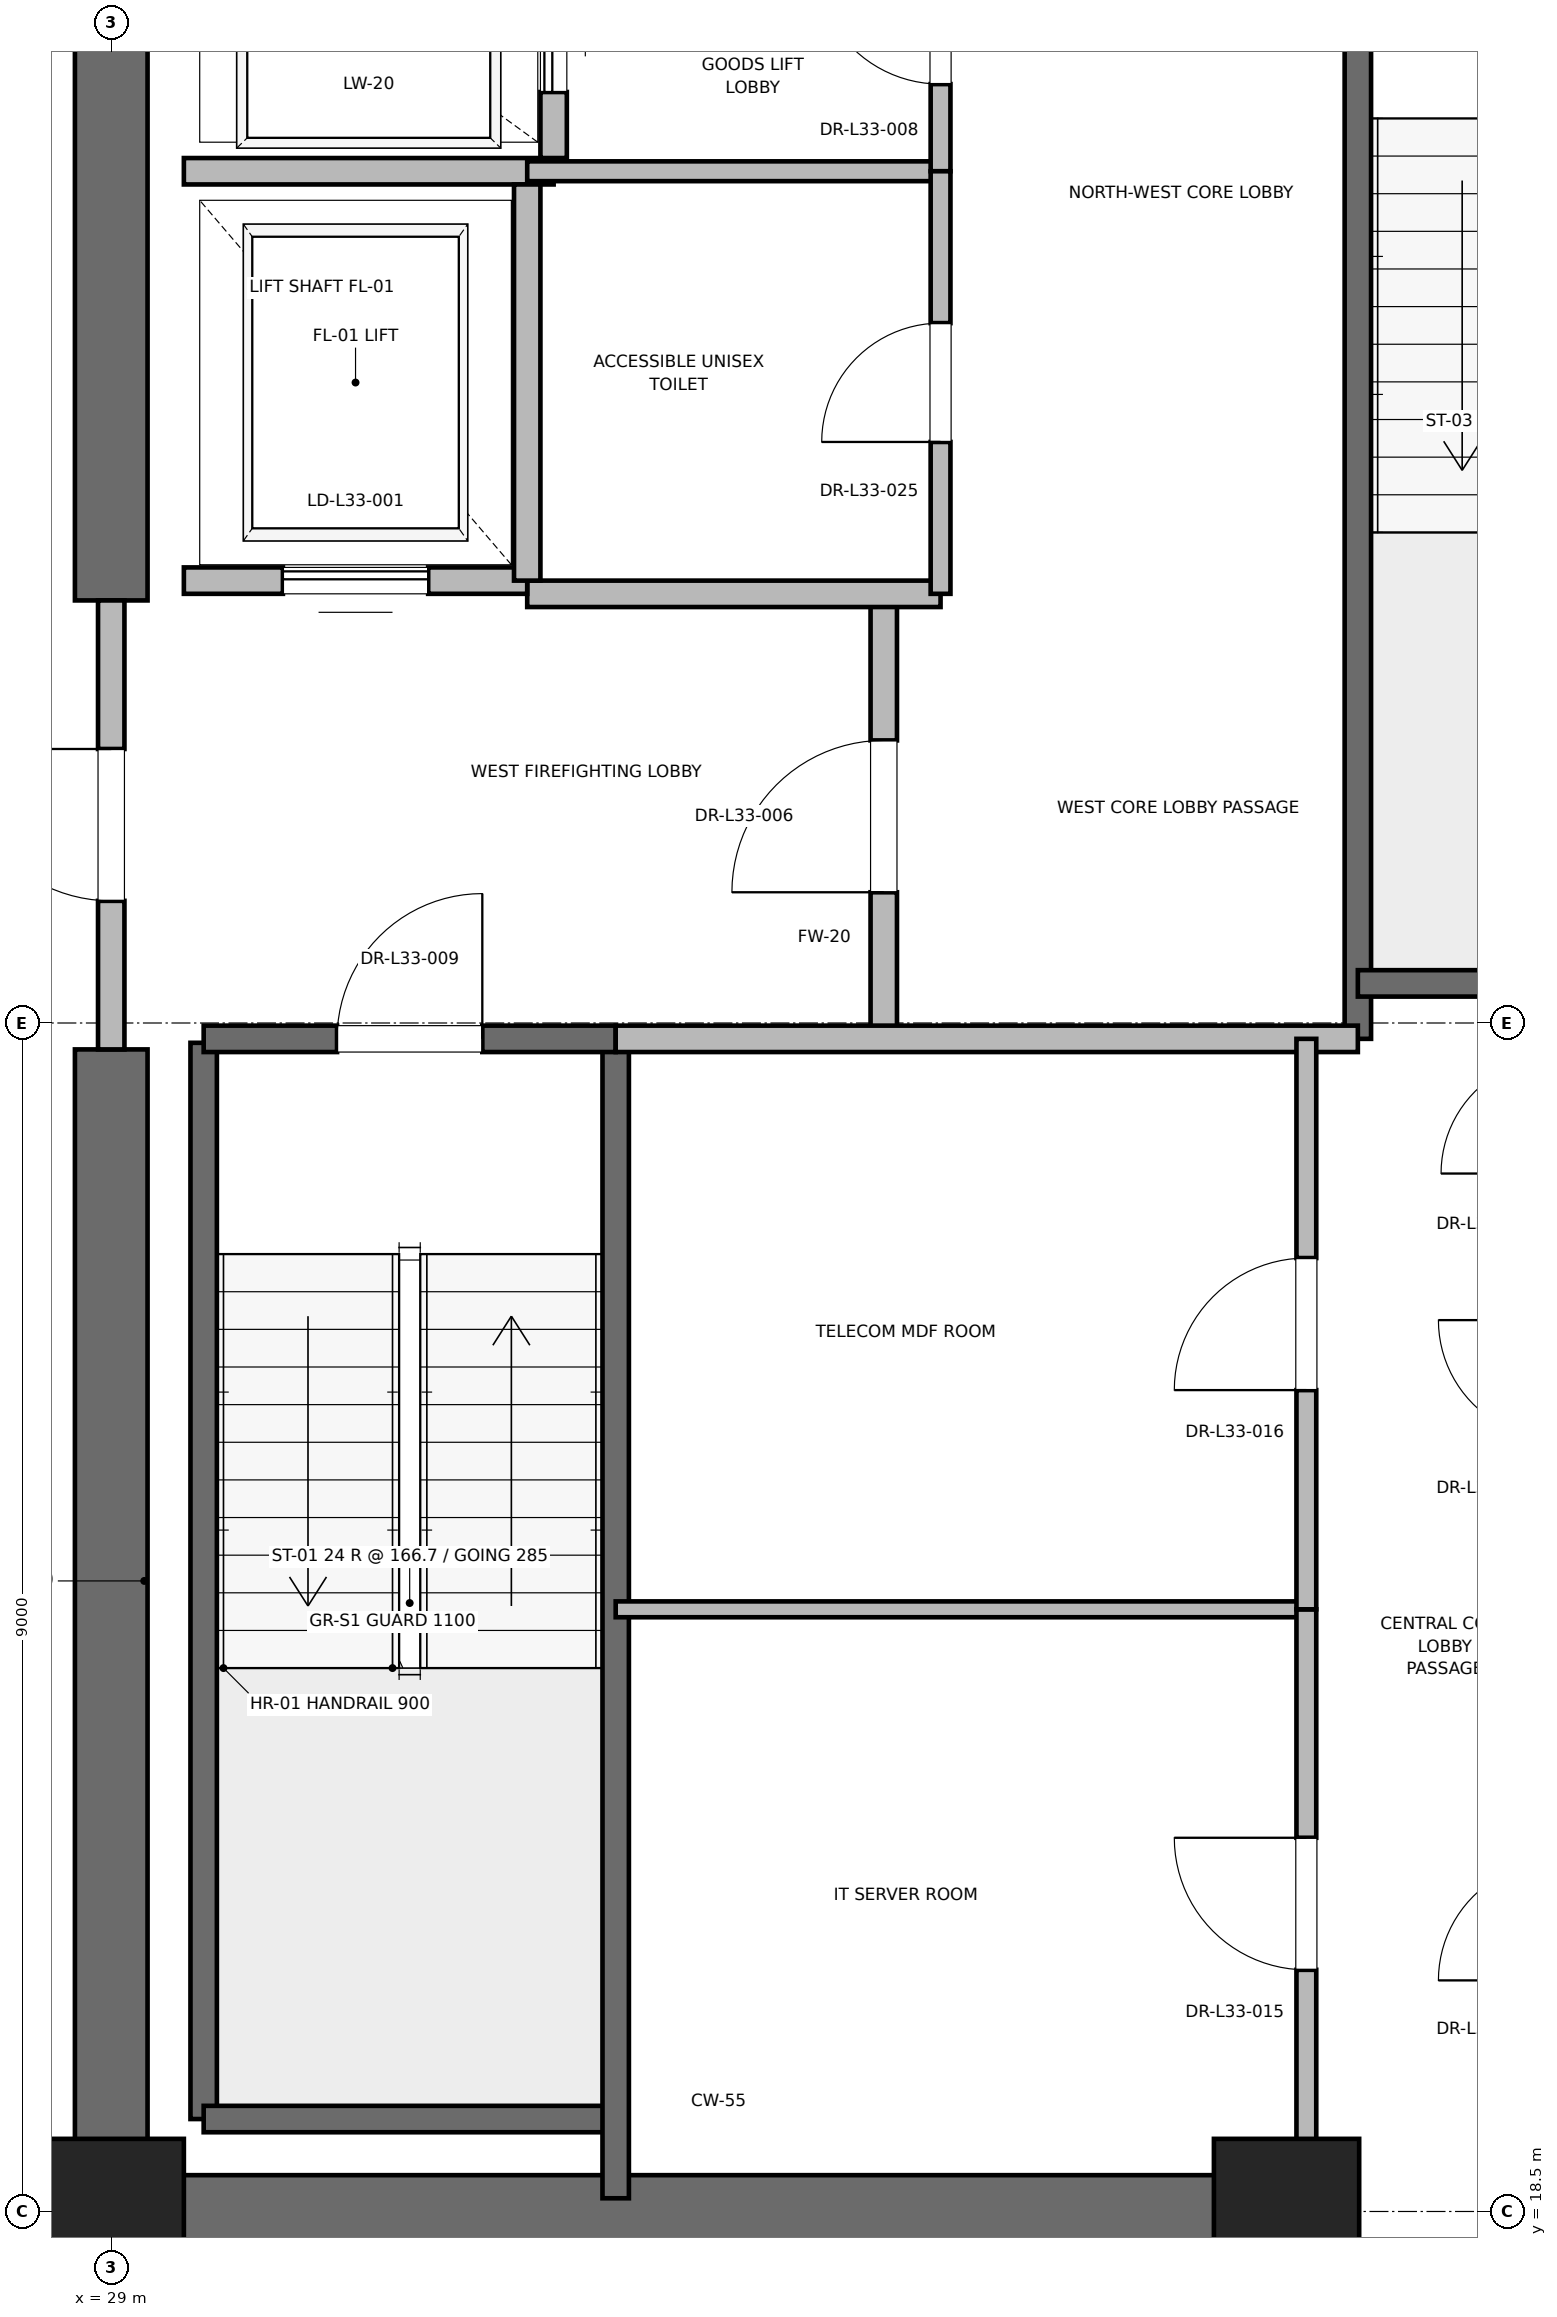
"""IFC4 building model, lengths in metres.
Left out: names, types, materials, properties, quantities, classifications, styles, units other than length and angle.
Written with IfcOpenShell. Run it as: python <this file> out.ifc"""

import sys

from ifc_helpers import new_model, si_unit, direction, frame, frame_2d, origin, origin_2d, place, context, subcontext, project, spatial, rectangle, extrude, element, fill, save


model = new_model("IFC4")
c1 = context("Model", 3, precision=1e-05, world=origin(), true_north=direction((0.0, 1.0)))
c2 = subcontext(c1, "Body", "Model", "MODEL_VIEW")
j1 = project(units=[si_unit("LENGTHUNIT", "METRE"), si_unit("PLANEANGLEUNIT", "RADIAN")], contexts=[c1])
p1 = place(None, origin())
s1 = spatial("IfcSite", under=j1, at=p1, CompositionType="ELEMENT")
p2 = place(p1, origin())
s2 = spatial("IfcBuilding", under=s1, at=p2, CompositionType="ELEMENT")
p3 = place(p2, frame((0.0, 0.0, 144.4)))
s3 = spatial("IfcBuildingStorey", under=s2, at=p3, CompositionType="ELEMENT", Elevation=144.4)
for number, where, z_axis, x_axis in (
    (1, (29.0, 18.5, 0.0), (0.0, 0.0, 1.0), (1.0, 0.0, 0.0)),
    (2, (37.9, 18.5, 0.0), (0.0, 0.0, 1.0), (1.0, 0.0, 0.0)),
):
    element("IfcColumn", number, at=place(p3, frame(where, z_axis=z_axis, x_axis=x_axis)), inside=s3, PredefinedType="PILASTER", context=c2, shape_type="SweptSolid", body=[
        extrude(rectangle(XDim=1.1, YDim=1.1, at=origin_2d()), origin(), (0.0, 0.0, 1.0), 4.0),
    ])
p4 = place(p3, frame((29.0, 18.5, 0.0), z_axis=(0.0, 0.0, 1.0), x_axis=(1.0, 0.0, 0.0)))
e3 = element("IfcWall", 3, at=p4, inside=s3, PredefinedType="SHEAR", context=c2, shape_type="SweptSolid", body=[
    extrude(rectangle(XDim=9.2, YDim=0.55, at=frame_2d((4.6, 0.0))), origin(), (0.0, 0.0, 1.0), 3.775),
])
p5 = place(p3, frame((29.0, 18.5, 0.0), z_axis=(0.0, 0.0, 1.0), x_axis=(0.0, 1.0, 0.0)))
e4 = element("IfcWall", 4, at=p5, inside=s3, PredefinedType="SHEAR", context=c2, shape_type="SweptSolid", body=[
    extrude(rectangle(XDim=8.8, YDim=0.55, at=frame_2d((4.4, 0.0))), origin(), (0.0, 0.0, 1.0), 3.775),
])
p6 = place(p3, frame((29.0, 30.7, 0.0), z_axis=(0.0, 0.0, 1.0), x_axis=(0.0, 1.0, 0.0)))
e5 = element("IfcWall", 5, at=p6, inside=s3, PredefinedType="SHEAR", context=c2, shape_type="SweptSolid", body=[
    extrude(rectangle(XDim=5.8, YDim=0.55, at=frame_2d((2.9, 0.0))), origin(), (0.0, 0.0, 1.0), 3.775),
])
p7 = place(p3, frame((29.7, 19.2, 0.0), z_axis=(0.0, 0.0, 1.0), x_axis=(0.0, 1.0, 0.0)))
e6 = element("IfcWall", 6, at=p7, inside=s3, PredefinedType="SOLIDWALL", context=c2, shape_type="SweptSolid", body=[
    extrude(rectangle(XDim=8.15, YDim=0.2, at=frame_2d((4.075, 0.0))), origin(), (0.0, 0.0, 1.0), 3.775),
])
p8 = place(p3, frame((29.7, 19.2, 0.0), z_axis=(0.0, 0.0, 1.0), x_axis=(1.0, 0.0, 0.0)))
e7 = element("IfcWall", 7, at=p8, inside=s3, PredefinedType="SOLIDWALL", context=c2, shape_type="SweptSolid", body=[
    extrude(rectangle(XDim=3.12, YDim=0.2, at=frame_2d((1.56, 0.0))), origin(), (0.0, 0.0, 1.0), 3.775),
])
p9 = place(p3, frame((32.82, 18.6, 0.0), z_axis=(0.0, 0.0, 1.0), x_axis=(0.0, 1.0, 0.0)))
e8 = element("IfcWall", 8, at=p9, inside=s3, PredefinedType="SOLIDWALL", context=c2, shape_type="SweptSolid", body=[
    extrude(rectangle(XDim=8.78, YDim=0.2, at=frame_2d((4.39, 0.0))), origin(), (0.0, 0.0, 1.0), 3.775),
])
p10 = place(p3, frame((29.7, 27.38, 0.0), z_axis=(0.0, 0.0, 1.0), x_axis=(1.0, 0.0, 0.0)))
e9 = element("IfcWall", 9, at=p10, inside=s3, PredefinedType="SOLIDWALL", context=c2, shape_type="SweptSolid", body=[
    extrude(rectangle(XDim=3.12, YDim=0.2, at=frame_2d((1.56, 0.0))), origin(), (0.0, 0.0, 1.0), 3.775),
])
p11 = place(p10, frame((1.01, 0.0, 0.0)))
e10 = element("IfcOpeningElement", 10, at=p11, cuts=e9, PredefinedType="OPENING", context=c2, shape_type="SweptSolid", body=[
    extrude(rectangle(XDim=1.1, YDim=2.15, at=frame_2d((0.55, 1.075))), frame((0.0, 0.1, 0.0), z_axis=(0.0, -1.0, 0.0), x_axis=(1.0, 0.0, 0.0)), (0.0, 0.0, 1.0), 0.2),
])
p12 = place(p3, frame((38.44, 27.38, 0.0), z_axis=(0.0, 0.0, 1.0), x_axis=(0.0, 1.0, 0.0)))
e11 = element("IfcWall", 11, at=p12, inside=s3, PredefinedType="SOLIDWALL", context=c2, shape_type="SweptSolid", body=[
    extrude(rectangle(XDim=8.87, YDim=0.2, at=frame_2d((4.435, 0.0))), origin(), (0.0, 0.0, 1.0), 3.775),
])
p13 = place(p3, frame((38.44, 27.8, 0.0), z_axis=(0.0, 0.0, 1.0), x_axis=(1.0, 0.0, 0.0)))
e12 = element("IfcWall", 12, at=p13, inside=s3, PredefinedType="SOLIDWALL", context=c2, shape_type="SweptSolid", body=[
    extrude(rectangle(XDim=3.32, YDim=0.2, at=frame_2d((1.66, 0.0))), origin(), (0.0, 0.0, 1.0), 3.775),
])
p14 = place(p3, frame((34.85, 27.38, 0.0), z_axis=(0.0, 0.0, 1.0), x_axis=(0.0, 1.0, 0.0)))
e13 = element("IfcWall", 13, at=p14, inside=s3, PredefinedType="PARTITIONING", context=c2, shape_type="SweptSolid", body=[
    extrude(rectangle(XDim=3.37, YDim=0.2, at=frame_2d((1.685, 0.0))), origin(), (0.0, 0.0, 1.0), 3.775),
])
p15 = place(p14, frame((1.11, 0.0, 0.0)))
e14 = element("IfcOpeningElement", 14, at=p15, cuts=e13, PredefinedType="OPENING", context=c2, shape_type="SweptSolid", body=[
    extrude(rectangle(XDim=1.15, YDim=2.2, at=frame_2d((0.575, 1.1))), frame((0.0, 0.1, 0.0), z_axis=(0.0, -1.0, 0.0), x_axis=(1.0, 0.0, 0.0)), (0.0, 0.0, 1.0), 0.2),
])
p16 = place(p3, frame((29.0, 27.3, 0.0), z_axis=(0.0, 0.0, 1.0), x_axis=(0.0, 1.0, 0.0)))
e15 = element("IfcWall", 15, at=p16, inside=s3, PredefinedType="PARTITIONING", context=c2, shape_type="SweptSolid", body=[
    extrude(rectangle(XDim=3.4, YDim=0.2, at=frame_2d((1.7, 0.0))), origin(), (0.0, 0.0, 1.0), 2.755),
])
p17 = place(p16, frame((1.125, 0.0, 0.0)))
e16 = element("IfcOpeningElement", 16, at=p17, cuts=e15, PredefinedType="OPENING", context=c2, shape_type="SweptSolid", body=[
    extrude(rectangle(XDim=1.15, YDim=2.2, at=frame_2d((0.575, 1.1))), frame((0.0, 0.1, 0.0), z_axis=(0.0, -1.0, 0.0), x_axis=(1.0, 0.0, 0.0)), (0.0, 0.0, 1.0), 0.2),
])
p18 = place(p3, frame((32.82, 27.38, 0.0), z_axis=(0.0, 0.0, 1.0), x_axis=(1.0, 0.0, 0.0)))
e17 = element("IfcWall", 17, at=p18, inside=s3, PredefinedType="PARTITIONING", context=c2, shape_type="SweptSolid", body=[
    extrude(rectangle(XDim=5.62, YDim=0.2, at=frame_2d((2.81, 0.0))), origin(), (0.0, 0.0, 1.0), 3.775),
])
p19 = place(p3, frame((32.15, 30.75, 0.0), z_axis=(0.0, 0.0, 1.0), x_axis=(1.0, 0.0, 0.0)))
e18 = element("IfcWall", 18, at=p19, inside=s3, PredefinedType="PARTITIONING", context=c2, shape_type="SweptSolid", body=[
    extrude(rectangle(XDim=3.13, YDim=0.2, at=frame_2d((1.565, 0.0))), origin(), (0.0, 0.0, 1.0), 3.775),
])
p20 = place(p3, frame((29.55, 30.85, 0.0), z_axis=(0.0, 0.0, 1.0), x_axis=(1.0, 0.0, 0.0)))
e19 = element("IfcWall", 19, at=p20, inside=s3, PredefinedType="SOLIDWALL", context=c2, shape_type="SweptSolid", body=[
    extrude(rectangle(XDim=2.6, YDim=0.2, at=frame_2d((1.3, 0.0))), origin(), (0.0, 0.0, 1.0), 2.755),
])
p21 = place(p20, frame((0.75, 0.0, 0.0)))
e20 = element("IfcOpeningElement", 20, at=p21, cuts=e19, PredefinedType="OPENING", context=c2, shape_type="SweptSolid", body=[
    extrude(rectangle(XDim=1.1, YDim=2.2, at=frame_2d((0.55, 1.1))), frame((0.0, 0.1, 0.0), z_axis=(0.0, -1.0, 0.0), x_axis=(1.0, 0.0, 0.0)), (0.0, 0.0, 1.0), 0.2),
])
p22 = place(p3, frame((29.55, 33.95, 0.0), z_axis=(0.0, 0.0, 1.0), x_axis=(1.0, 0.0, 0.0)))
e21 = element("IfcWall", 21, at=p22, inside=s3, PredefinedType="SOLIDWALL", context=c2, shape_type="SweptSolid", body=[
    extrude(rectangle(XDim=2.8, YDim=0.2, at=frame_2d((1.4, 0.0))), origin(), (0.0, 0.0, 1.0), 3.775),
])
p23 = place(p3, frame((32.15, 30.85, 0.0), z_axis=(0.0, 0.0, 1.0), x_axis=(0.0, 1.0, 0.0)))
e22 = element("IfcWall", 22, at=p23, inside=s3, PredefinedType="SOLIDWALL", context=c2, shape_type="SweptSolid", body=[
    extrude(rectangle(XDim=3.0, YDim=0.2, at=frame_2d((1.5, 0.0))), origin(), (0.0, 0.0, 1.0), 3.775),
])
p24 = place(p3, frame((32.35, 34.05, 0.0), z_axis=(0.0, 0.0, 1.0), x_axis=(0.0, 1.0, 0.0)))
e23 = element("IfcWall", 23, at=p24, inside=s3, PredefinedType="SOLIDWALL", context=c2, shape_type="SweptSolid", body=[
    extrude(rectangle(XDim=2.1, YDim=0.2, at=frame_2d((1.05, 0.0))), origin(), (0.0, 0.0, 1.0), 3.775),
])
p25 = place(p24, frame((0.5, 0.0, 0.0)))
e24 = element("IfcOpeningElement", 24, at=p25, cuts=e23, PredefinedType="OPENING", context=c2, shape_type="SweptSolid", body=[
    extrude(rectangle(XDim=1.1, YDim=2.2, at=frame_2d((0.55, 1.1))), frame((0.0, 0.1, 0.0), z_axis=(0.0, -1.0, 0.0), x_axis=(1.0, 0.0, 0.0)), (0.0, 0.0, 1.0), 0.2),
])
p26 = place(p3, frame((32.15, 33.95, 0.0), z_axis=(0.0, 0.0, 1.0), x_axis=(1.0, 0.0, 0.0)))
e25 = element("IfcWall", 25, at=p26, inside=s3, PredefinedType="PARTITIONING", context=c2, shape_type="SweptSolid", body=[
    extrude(rectangle(XDim=3.13, YDim=0.15, at=frame_2d((1.565, 0.0))), origin(), (0.0, 0.0, 1.0), 2.85),
])
p27 = place(p3, frame((35.28, 33.95, 0.0), z_axis=(0.0, 0.0, 1.0), x_axis=(0.0, 1.0, 0.0)))
e26 = element("IfcWall", 26, at=p27, inside=s3, PredefinedType="PARTITIONING", context=c2, shape_type="SweptSolid", body=[
    extrude(rectangle(XDim=2.27, YDim=0.15, at=frame_2d((1.135, 0.0))), origin(), (0.0, 0.0, 1.0), 2.755),
])
p28 = place(p27, frame((0.66, 0.0, 0.0)))
e27 = element("IfcOpeningElement", 27, at=p28, cuts=e26, PredefinedType="OPENING", context=c2, shape_type="SweptSolid", body=[
    extrude(rectangle(XDim=0.95, YDim=2.15, at=frame_2d((0.475, 1.075))), frame((0.0, 0.075, 0.0), z_axis=(0.0, -1.0, 0.0), x_axis=(1.0, 0.0, 0.0)), (0.0, 0.0, 1.0), 0.15),
])
p29 = place(p3, frame((35.28, 30.75, 0.0), z_axis=(0.0, 0.0, 1.0), x_axis=(0.0, 1.0, 0.0)))
e28 = element("IfcWall", 28, at=p29, inside=s3, PredefinedType="PARTITIONING", context=c2, shape_type="SweptSolid", body=[
    extrude(rectangle(XDim=3.2, YDim=0.15, at=frame_2d((1.6, 0.0))), origin(), (0.0, 0.0, 1.0), 2.85),
])
p30 = place(p29, frame((1.15, 0.0, 0.0)))
e29 = element("IfcOpeningElement", 29, at=p30, cuts=e28, PredefinedType="OPENING", context=c2, shape_type="SweptSolid", body=[
    extrude(rectangle(XDim=0.9, YDim=2.1, at=frame_2d((0.45, 1.05))), frame((0.0, 0.075, 0.0), z_axis=(0.0, -1.0, 0.0), x_axis=(1.0, 0.0, 0.0)), (0.0, 0.0, 1.0), 0.15),
])
p31 = place(p3, frame((32.82, 23.06, 0.0), z_axis=(0.0, 0.0, 1.0), x_axis=(1.0, 0.0, 0.0)))
e30 = element("IfcWall", 30, at=p31, inside=s3, PredefinedType="PARTITIONING", context=c2, shape_type="SweptSolid", body=[
    extrude(rectangle(XDim=5.23, YDim=0.12, at=frame_2d((2.615, 0.0))), origin(), (0.0, 0.0, 1.0), 2.85),
])
p32 = place(p3, frame((38.05, 18.6, 0.0), z_axis=(0.0, 0.0, 1.0), x_axis=(0.0, 1.0, 0.0)))
e31 = element("IfcWall", 31, at=p32, inside=s3, PredefinedType="PARTITIONING", context=c2, shape_type="SweptSolid", body=[
    extrude(rectangle(XDim=4.46, YDim=0.15, at=frame_2d((2.23, 0.0))), origin(), (0.0, 0.0, 1.0), 2.755),
])
p33 = place(p32, frame((1.73, 0.0, 0.0)))
e32 = element("IfcOpeningElement", 32, at=p33, cuts=e31, PredefinedType="OPENING", context=c2, shape_type="SweptSolid", body=[
    extrude(rectangle(XDim=1.0, YDim=2.15, at=frame_2d((0.5, 1.075))), frame((0.0, 0.075, 0.0), z_axis=(0.0, -1.0, 0.0), x_axis=(1.0, 0.0, 0.0)), (0.0, 0.0, 1.0), 0.15),
])
p34 = place(p3, frame((38.05, 23.06, 0.0), z_axis=(0.0, 0.0, 1.0), x_axis=(0.0, 1.0, 0.0)))
e33 = element("IfcWall", 33, at=p34, inside=s3, PredefinedType="PARTITIONING", context=c2, shape_type="SweptSolid", body=[
    extrude(rectangle(XDim=4.32, YDim=0.15, at=frame_2d((2.16, 0.0))), origin(), (0.0, 0.0, 1.0), 2.85),
])
p35 = place(p34, frame((1.66, 0.0, 0.0)))
e34 = element("IfcOpeningElement", 34, at=p35, cuts=e33, PredefinedType="OPENING", context=c2, shape_type="SweptSolid", body=[
    extrude(rectangle(XDim=1.0, YDim=2.15, at=frame_2d((0.5, 1.075))), frame((0.0, 0.075, 0.0), z_axis=(0.0, -1.0, 0.0), x_axis=(1.0, 0.0, 0.0)), (0.0, 0.0, 1.0), 0.15),
])
p36 = place(p11, origin())
e35 = element("IfcDoor", 35, at=p36, inside=s3, OperationType="SINGLE_SWING_RIGHT", PredefinedType="DOOR", context=c2, shape_type="SweptSolid", body=[
    extrude(rectangle(XDim=1.1, YDim=2.15, at=frame_2d((0.55, 1.075))), frame((0.0, 0.025, 0.0), z_axis=(0.0, -1.0, 0.0), x_axis=(1.0, 0.0, 0.0)), (0.0, 0.0, 1.0), 0.05),
])
fill(e10, e35)
p37 = place(p15, origin())
e36 = element("IfcDoor", 36, at=p37, inside=s3, OperationType="SINGLE_SWING_LEFT", PredefinedType="DOOR", context=c2, shape_type="SweptSolid", body=[
    extrude(rectangle(XDim=1.15, YDim=2.2, at=frame_2d((0.575, 1.1))), frame((0.0, 0.025, 0.0), z_axis=(0.0, -1.0, 0.0), x_axis=(1.0, 0.0, 0.0)), (0.0, 0.0, 1.0), 0.05),
])
fill(e14, e36)
p38 = place(p17, origin())
e37 = element("IfcDoor", 37, at=p38, inside=s3, OperationType="SINGLE_SWING_RIGHT", PredefinedType="DOOR", context=c2, shape_type="SweptSolid", body=[
    extrude(rectangle(XDim=1.15, YDim=2.2, at=frame_2d((0.575, 1.1))), frame((0.0, 0.025, 0.0), z_axis=(0.0, -1.0, 0.0), x_axis=(1.0, 0.0, 0.0)), (0.0, 0.0, 1.0), 0.05),
])
fill(e16, e37)
p39 = place(p21, origin())
e38 = element("IfcDoor", 38, at=p39, inside=s3, OperationType="SLIDING_TO_RIGHT", PredefinedType="DOOR", context=c2, shape_type="SweptSolid", body=[
    extrude(rectangle(XDim=1.1, YDim=2.2, at=frame_2d((0.55, 1.1))), frame((0.0, 0.025, 0.0), z_axis=(0.0, -1.0, 0.0), x_axis=(1.0, 0.0, 0.0)), (0.0, 0.0, 1.0), 0.05),
])
fill(e20, e38)
p40 = place(p25, origin())
e39 = element("IfcDoor", 39, at=p40, inside=s3, OperationType="SLIDING_TO_RIGHT", PredefinedType="DOOR", context=c2, shape_type="SweptSolid", body=[
    extrude(rectangle(XDim=1.1, YDim=2.2, at=frame_2d((0.55, 1.1))), frame((0.0, 0.025, 0.0), z_axis=(0.0, -1.0, 0.0), x_axis=(1.0, 0.0, 0.0)), (0.0, 0.0, 1.0), 0.05),
])
fill(e24, e39)
p41 = place(p28, origin())
e40 = element("IfcDoor", 40, at=p41, inside=s3, OperationType="SINGLE_SWING_RIGHT", PredefinedType="DOOR", context=c2, shape_type="SweptSolid", body=[
    extrude(rectangle(XDim=0.95, YDim=2.15, at=frame_2d((0.475, 1.075))), frame((0.0, 0.025, 0.0), z_axis=(0.0, -1.0, 0.0), x_axis=(1.0, 0.0, 0.0)), (0.0, 0.0, 1.0), 0.05),
])
fill(e27, e40)
p42 = place(p30, origin())
e41 = element("IfcDoor", 41, at=p42, inside=s3, OperationType="SINGLE_SWING_LEFT", PredefinedType="DOOR", context=c2, shape_type="SweptSolid", body=[
    extrude(rectangle(XDim=0.9, YDim=2.1, at=frame_2d((0.45, 1.05))), frame((0.0, 0.025, 0.0), z_axis=(0.0, -1.0, 0.0), x_axis=(1.0, 0.0, 0.0)), (0.0, 0.0, 1.0), 0.05),
])
fill(e29, e41)
p43 = place(p33, origin())
e42 = element("IfcDoor", 42, at=p43, inside=s3, OperationType="SINGLE_SWING_RIGHT", PredefinedType="DOOR", context=c2, shape_type="SweptSolid", body=[
    extrude(rectangle(XDim=1.0, YDim=2.15, at=frame_2d((0.5, 1.075))), frame((0.0, 0.025, 0.0), z_axis=(0.0, -1.0, 0.0), x_axis=(1.0, 0.0, 0.0)), (0.0, 0.0, 1.0), 0.05),
])
fill(e32, e42)
p44 = place(p35, origin())
e43 = element("IfcDoor", 43, at=p44, inside=s3, OperationType="SINGLE_SWING_LEFT", PredefinedType="DOOR", context=c2, shape_type="SweptSolid", body=[
    extrude(rectangle(XDim=1.0, YDim=2.15, at=frame_2d((0.5, 1.075))), frame((0.0, 0.025, 0.0), z_axis=(0.0, -1.0, 0.0), x_axis=(1.0, 0.0, 0.0)), (0.0, 0.0, 1.0), 0.05),
])
fill(e34, e43)
save(model, sys.argv[1])
